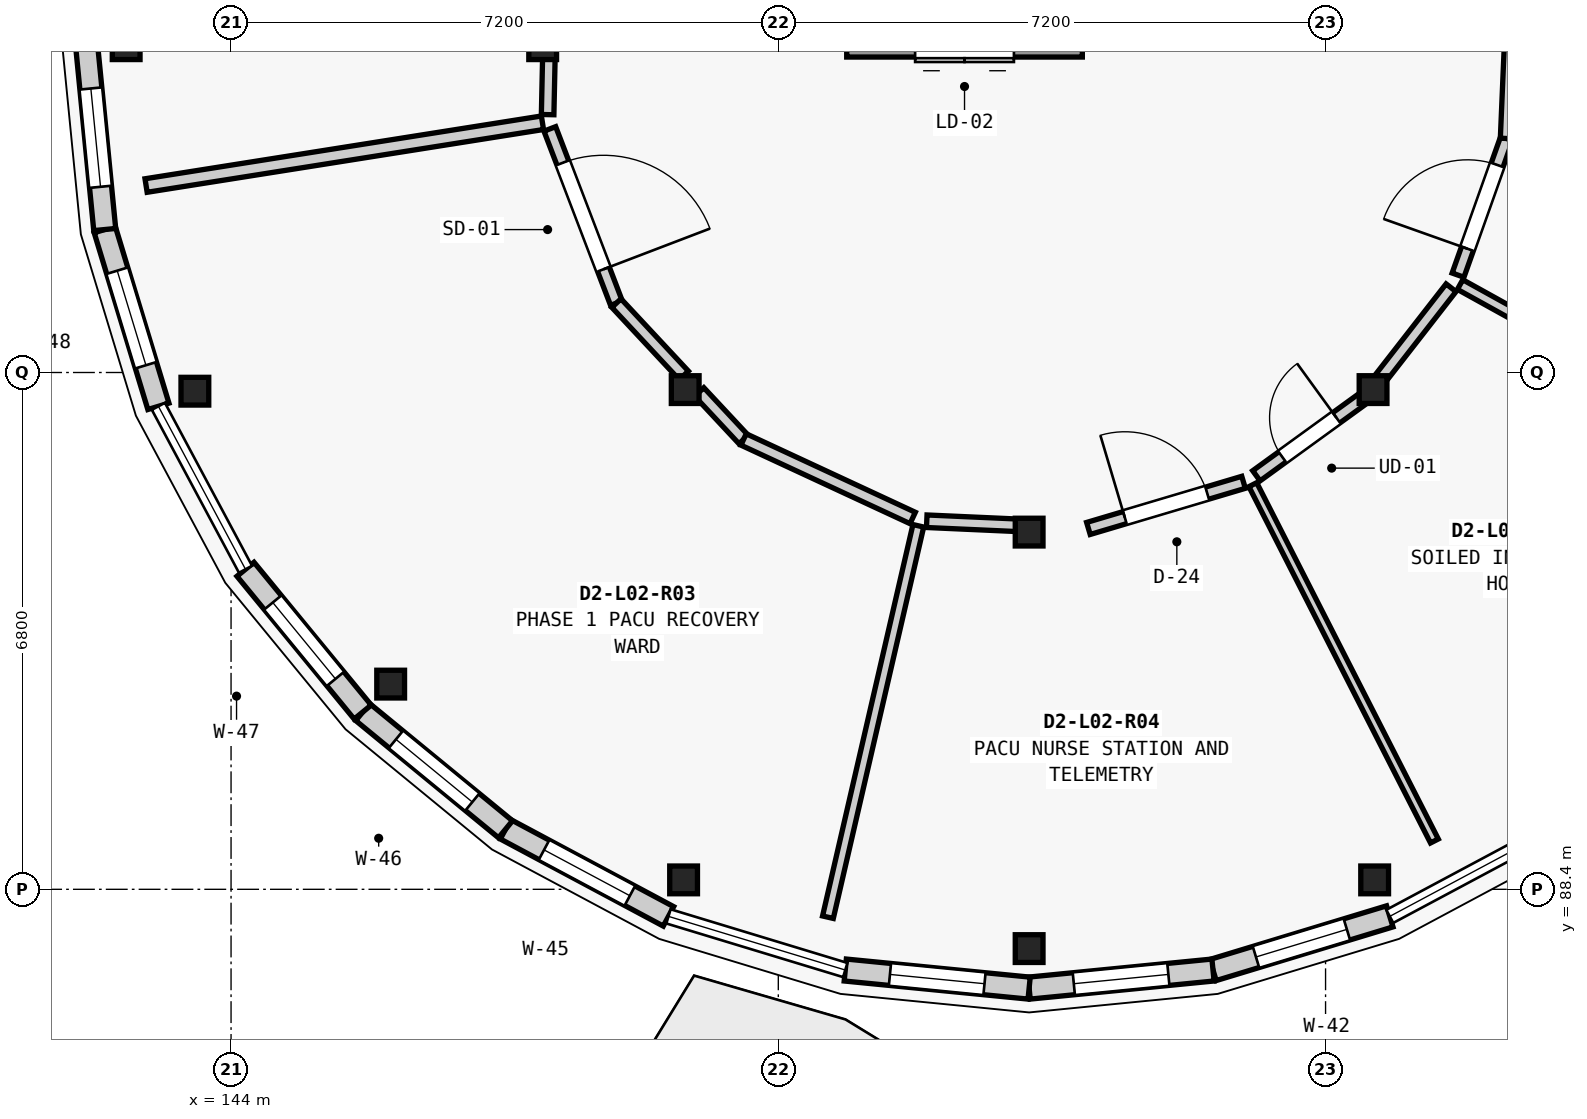
"""IFC4 building model, lengths in metres.
Left out: names, types, materials, properties, quantities, classifications, styles, units other than length and angle.
Written with IfcOpenShell. Run it as: python <this file> out.ifc"""

import sys

from ifc_helpers import new_model, si_unit, direction, frame, frame_2d, origin, origin_2d, place, context, subcontext, project, spatial, rectangle, extrude, element, fill, save


model = new_model("IFC4")
c1 = context("Model", 3, precision=1e-05, world=origin(), true_north=direction((0.0, 1.0)))
c2 = subcontext(c1, "Body", "Model", "MODEL_VIEW")
j1 = project(units=[si_unit("LENGTHUNIT", "METRE"), si_unit("PLANEANGLEUNIT", "RADIAN")], contexts=[c1])
p1 = place(None, origin())
s1 = spatial("IfcSite", under=j1, at=p1, CompositionType="ELEMENT")
p2 = place(p1, origin())
s2 = spatial("IfcBuilding", under=s1, at=p2, CompositionType="ELEMENT")
p3 = place(p2, frame((0.0, 0.0, 8.75)))
s3 = spatial("IfcBuildingStorey", under=s2, at=p3, CompositionType="ELEMENT", Elevation=8.75)
for number, where, z_axis, x_axis in (
    (1, (142.62, 99.5, 0.0), (0.0, 0.0, 1.0), (1.0, 0.0, 0.0)),
    (2, (143.524, 94.954, 0.0), (0.0, 0.0, 1.0), (1.0, 0.0, 0.0)),
    (3, (146.1, 91.1, 0.0), (0.0, 0.0, 1.0), (1.0, 0.0, 0.0)),
    (4, (149.954, 88.524, 0.0), (0.0, 0.0, 1.0), (1.0, 0.0, 0.0)),
    (5, (154.5, 87.62, 0.0), (0.0, 0.0, 1.0), (1.0, 0.0, 0.0)),
    (6, (159.046, 88.524, 0.0), (0.0, 0.0, 1.0), (1.0, 0.0, 0.0)),
    (7, (148.1, 99.5, 0.0), (0.0, 0.0, 1.0), (1.0, 0.0, 0.0)),
    (8, (149.975, 94.975, 0.0), (0.0, 0.0, 1.0), (1.0, 0.0, 0.0)),
    (9, (154.5, 93.1, 0.0), (0.0, 0.0, 1.0), (1.0, 0.0, 0.0)),
    (10, (159.025, 94.975, 0.0), (0.0, 0.0, 1.0), (1.0, 0.0, 0.0)),
):
    element("IfcColumn", number, at=place(p3, frame(where, z_axis=z_axis, x_axis=x_axis)), inside=s3, PredefinedType="COLUMN", context=c2, shape_type="SweptSolid", body=[
        extrude(rectangle(XDim=0.365, YDim=0.365, at=origin_2d()), origin(), (0.0, 0.0, 1.0), 4.2),
    ])
p4 = place(p3, frame((159.245, 88.044, 0.0), z_axis=(0.0, 0.0, 1.0), x_axis=(-0.956892539407, -0.290442193951, 0.0)))
e11 = element("IfcWall", 11, at=p4, inside=s3, PredefinedType="ELEMENTEDWALL", context=c2, shape_type="SweptSolid", body=[
    extrude(rectangle(XDim=2.431, YDim=0.29, at=frame_2d((1.215, 0.0))), origin(), (0.0, 0.0, 1.0), 3.329),
])
p5 = place(p4, frame((0.59, 0.0, 0.85)))
e12 = element("IfcOpeningElement", 12, at=p5, cuts=e11, PredefinedType="OPENING", context=c2, shape_type="SweptSolid", body=[
    extrude(rectangle(XDim=1.25, YDim=1.5, at=frame_2d((0.625, 0.75))), frame((0.0, 0.155, 0.0), z_axis=(0.0, -1.0, 0.0), x_axis=(1.0, 0.0, 0.0)), (0.0, 0.0, 1.0), 0.31),
])
p6 = place(p3, frame((156.919, 87.338, 0.0), z_axis=(0.0, 0.0, 1.0), x_axis=(-0.995202863323, -0.097832820839, 0.0)))
e13 = element("IfcWall", 13, at=p6, inside=s3, PredefinedType="ELEMENTEDWALL", context=c2, shape_type="SweptSolid", body=[
    extrude(rectangle(XDim=2.431, YDim=0.29, at=frame_2d((1.215, 0.0))), origin(), (0.0, 0.0, 1.0), 3.329),
])
p7 = place(p6, frame((0.59, 0.0, 0.85)))
e14 = element("IfcOpeningElement", 14, at=p7, cuts=e13, PredefinedType="OPENING", context=c2, shape_type="SweptSolid", body=[
    extrude(rectangle(XDim=1.25, YDim=1.8, at=frame_2d((0.625, 0.9))), frame((0.0, 0.155, 0.0), z_axis=(0.0, -1.0, 0.0), x_axis=(1.0, 0.0, 0.0)), (0.0, 0.0, 1.0), 0.31),
])
p8 = place(p3, frame((154.5, 87.1, 0.0), z_axis=(0.0, 0.0, 1.0), x_axis=(-0.995202863323, 0.097832820839, 0.0)))
e15 = element("IfcWall", 15, at=p8, inside=s3, PredefinedType="ELEMENTEDWALL", context=c2, shape_type="SweptSolid", body=[
    extrude(rectangle(XDim=2.431, YDim=0.29, at=frame_2d((1.215, 0.0))), origin(), (0.0, 0.0, 1.0), 3.329),
])
p9 = place(p8, frame((0.59, 0.0, 0.85)))
e16 = element("IfcOpeningElement", 16, at=p9, cuts=e15, PredefinedType="OPENING", context=c2, shape_type="SweptSolid", body=[
    extrude(rectangle(XDim=1.25, YDim=2.1, at=frame_2d((0.625, 1.05))), frame((0.0, 0.155, 0.0), z_axis=(0.0, -1.0, 0.0), x_axis=(1.0, 0.0, 0.0)), (0.0, 0.0, 1.0), 0.31),
])
p10 = place(p3, frame((149.755, 88.044, 0.0), z_axis=(0.0, 0.0, 1.0), x_axis=(-0.881902152415, 0.471432490996, 0.0)))
e17 = element("IfcWall", 17, at=p10, inside=s3, PredefinedType="ELEMENTEDWALL", context=c2, shape_type="SweptSolid", body=[
    extrude(rectangle(XDim=2.431, YDim=0.29, at=frame_2d((1.215, 0.0))), origin(), (0.0, 0.0, 1.0), 3.329),
])
p11 = place(p10, frame((0.576, 0.0, 0.85)))
e18 = element("IfcOpeningElement", 18, at=p11, cuts=e17, PredefinedType="OPENING", context=c2, shape_type="SweptSolid", body=[
    extrude(rectangle(XDim=1.28, YDim=1.65, at=frame_2d((0.64, 0.825))), frame((0.0, 0.155, 0.0), z_axis=(0.0, -1.0, 0.0), x_axis=(1.0, 0.0, 0.0)), (0.0, 0.0, 1.0), 0.31),
])
p12 = place(p3, frame((147.611, 89.19, 0.0), z_axis=(0.0, 0.0, 1.0), x_axis=(-0.773048113134, 0.634347392822, 0.0)))
e19 = element("IfcWall", 19, at=p12, inside=s3, PredefinedType="ELEMENTEDWALL", context=c2, shape_type="SweptSolid", body=[
    extrude(rectangle(XDim=2.431, YDim=0.29, at=frame_2d((1.215, 0.0))), origin(), (0.0, 0.0, 1.0), 3.329),
])
p13 = place(p12, frame((0.565, 0.0, 0.85)))
e20 = element("IfcOpeningElement", 20, at=p13, cuts=e19, PredefinedType="OPENING", context=c2, shape_type="SweptSolid", body=[
    extrude(rectangle(XDim=1.3, YDim=1.4, at=frame_2d((0.65, 0.7))), frame((0.0, 0.155, 0.0), z_axis=(0.0, -1.0, 0.0), x_axis=(1.0, 0.0, 0.0)), (0.0, 0.0, 1.0), 0.31),
])
p14 = place(p3, frame((145.732, 90.732, 0.0), z_axis=(0.0, 0.0, 1.0), x_axis=(-0.634347392822, 0.773048113134, 0.0)))
e21 = element("IfcWall", 21, at=p14, inside=s3, PredefinedType="ELEMENTEDWALL", context=c2, shape_type="SweptSolid", body=[
    extrude(rectangle(XDim=2.431, YDim=0.29, at=frame_2d((1.215, 0.0))), origin(), (0.0, 0.0, 1.0), 3.329),
])
p15 = place(p14, frame((0.565, 0.0, 0.85)))
e22 = element("IfcOpeningElement", 22, at=p15, cuts=e21, PredefinedType="OPENING", context=c2, shape_type="SweptSolid", body=[
    extrude(rectangle(XDim=1.3, YDim=1.7, at=frame_2d((0.65, 0.85))), frame((0.0, 0.155, 0.0), z_axis=(0.0, -1.0, 0.0), x_axis=(1.0, 0.0, 0.0)), (0.0, 0.0, 1.0), 0.31),
])
p16 = place(p3, frame((143.044, 94.755, 0.0), z_axis=(0.0, 0.0, 1.0), x_axis=(-0.290442193951, 0.956892539407, 0.0)))
e23 = element("IfcWall", 23, at=p16, inside=s3, PredefinedType="ELEMENTEDWALL", context=c2, shape_type="SweptSolid", body=[
    extrude(rectangle(XDim=2.431, YDim=0.29, at=frame_2d((1.215, 0.0))), origin(), (0.0, 0.0, 1.0), 3.329),
])
p17 = place(p16, frame((0.565, 0.0, 0.85)))
e24 = element("IfcOpeningElement", 24, at=p17, cuts=e23, PredefinedType="OPENING", context=c2, shape_type="SweptSolid", body=[
    extrude(rectangle(XDim=1.3, YDim=2.0, at=frame_2d((0.65, 1.0))), frame((0.0, 0.155, 0.0), z_axis=(0.0, -1.0, 0.0), x_axis=(1.0, 0.0, 0.0)), (0.0, 0.0, 1.0), 0.31),
])
p18 = place(p3, frame((142.338, 97.081, 0.0), z_axis=(0.0, 0.0, 1.0), x_axis=(-0.097832820839, 0.995202863323, 0.0)))
e25 = element("IfcWall", 25, at=p18, inside=s3, PredefinedType="ELEMENTEDWALL", context=c2, shape_type="SweptSolid", body=[
    extrude(rectangle(XDim=2.431, YDim=0.29, at=frame_2d((1.215, 0.0))), origin(), (0.0, 0.0, 1.0), 3.329),
])
p19 = place(p18, frame((0.565, 0.0, 0.7)))
e26 = element("IfcOpeningElement", 26, at=p19, cuts=e25, PredefinedType="OPENING", context=c2, shape_type="SweptSolid", body=[
    extrude(rectangle(XDim=1.3, YDim=2.3, at=frame_2d((0.65, 1.15))), frame((0.0, 0.155, 0.0), z_axis=(0.0, -1.0, 0.0), x_axis=(1.0, 0.0, 0.0)), (0.0, 0.0, 1.0), 0.31),
])
p20 = place(p3, frame((152.1, 99.463, 0.0), z_axis=(0.0, 0.0, 1.0), x_axis=(1.0, 0.0, 0.0)))
e27 = element("IfcWall", 27, at=p20, inside=s3, PredefinedType="SHEAR", context=c2, shape_type="SweptSolid", body=[
    extrude(rectangle(XDim=3.1, YDim=0.225, at=frame_2d((1.55, 0.0))), origin(), (0.0, 0.0, 1.0), 3.975),
])
p21 = place(p20, frame((0.9, 0.0, 0.0)))
e28 = element("IfcOpeningElement", 28, at=p21, cuts=e27, PredefinedType="OPENING", context=c2, shape_type="SweptSolid", body=[
    extrude(rectangle(XDim=1.3, YDim=2.2, at=frame_2d((0.65, 1.1))), frame((0.0, 0.123, 0.0), z_axis=(0.0, -1.0, 0.0), x_axis=(1.0, 0.0, 0.0)), (0.0, 0.0, 1.0), 0.245),
])
p22 = place(p3, frame((148.097, 98.486, 0.0), z_axis=(0.0, 0.0, 1.0), x_axis=(-0.98768185006, -0.156475439167, 0.0)))
e29 = element("IfcWall", 29, at=p22, inside=s3, PredefinedType="PARTITIONING", context=c2, shape_type="SweptSolid", body=[
    extrude(rectangle(XDim=5.28, YDim=0.18, at=frame_2d((2.64, 0.0))), origin(), (0.0, 0.0, 1.0), 3.304),
])
p23 = place(p3, frame((153.042, 93.183, 0.0), z_axis=(0.0, 0.0, 1.0), x_axis=(-0.224943840984, -0.974371730093, 0.0)))
e30 = element("IfcWall", 30, at=p23, inside=s3, PredefinedType="PARTITIONING", context=c2, shape_type="SweptSolid", body=[
    extrude(rectangle(XDim=5.286, YDim=0.145, at=frame_2d((2.643, 0.0))), origin(), (0.0, 0.0, 1.0), 3.304),
])
p24 = place(p3, frame((157.443, 93.724, 0.0), z_axis=(0.0, 0.0, 1.0), x_axis=(0.454011967175, -0.890995585658, 0.0)))
e31 = element("IfcWall", 31, at=p24, inside=s3, PredefinedType="PARTITIONING", context=c2, shape_type="SweptSolid", body=[
    extrude(rectangle(XDim=5.262, YDim=0.115, at=frame_2d((2.631, 0.0))), origin(), (0.0, 0.0, 1.0), 3.304),
])
p25 = place(p3, frame((160.17, 96.357, 0.0), z_axis=(0.0, 0.0, 1.0), x_axis=(0.874649389138, -0.484756068638, 0.0)))
e32 = element("IfcWall", 32, at=p25, inside=s3, PredefinedType="PARTITIONING", context=c2, shape_type="SweptSolid", body=[
    extrude(rectangle(XDim=5.26, YDim=0.145, at=frame_2d((2.63, 0.0))), origin(), (0.0, 0.0, 1.0), 3.304),
])
p26 = place(p3, frame((148.181, 99.331, 0.0), z_axis=(0.0, 0.0, 1.0), x_axis=(-0.021496850658, -0.999768916006, 0.0)))
e33 = element("IfcWall", 33, at=p26, inside=s3, PredefinedType="PARTITIONING", context=c2, shape_type="SweptSolid", body=[
    extrude(rectangle(XDim=0.738, YDim=0.165, at=frame_2d((0.369, 0.0))), origin(), (0.0, 0.0, 1.0), 3.304),
])
p27 = place(p3, frame((148.194, 98.405, 0.0), z_axis=(0.0, 0.0, 1.0), x_axis=(0.357004696351, -0.934102589004, 0.0)))
e34 = element("IfcWall", 34, at=p27, inside=s3, PredefinedType="PARTITIONING", context=c2, shape_type="SweptSolid", body=[
    extrude(rectangle(XDim=2.454, YDim=0.165, at=frame_2d((1.227, 0.0))), origin(), (0.0, 0.0, 1.0), 3.304),
])
p28 = place(p27, frame((0.477, 0.0, 0.0)))
e35 = element("IfcOpeningElement", 35, at=p28, cuts=e34, PredefinedType="OPENING", context=c2, shape_type="SweptSolid", body=[
    extrude(rectangle(XDim=1.5, YDim=2.3, at=frame_2d((0.75, 1.15))), frame((0.0, 0.093, 0.0), z_axis=(0.0, -1.0, 0.0), x_axis=(1.0, 0.0, 0.0)), (0.0, 0.0, 1.0), 0.185),
])
p29 = place(p3, frame((149.07, 96.113, 0.0), z_axis=(0.0, 0.0, 1.0), x_axis=(0.682084089324, -0.731273748395, 0.0)))
e36 = element("IfcWall", 36, at=p29, inside=s3, PredefinedType="PARTITIONING", context=c2, shape_type="SweptSolid", body=[
    extrude(rectangle(XDim=1.3, YDim=0.165, at=frame_2d((0.65, 0.0))), origin(), (0.0, 0.0, 1.0), 3.304),
])
p30 = place(p3, frame((150.16, 94.944, 0.0), z_axis=(0.0, 0.0, 1.0), x_axis=(0.682114678072, -0.731245216024, 0.0)))
e37 = element("IfcWall", 37, at=p30, inside=s3, PredefinedType="PARTITIONING", context=c2, shape_type="SweptSolid", body=[
    extrude(rectangle(XDim=0.855, YDim=0.165, at=frame_2d((0.427, 0.0))), origin(), (0.0, 0.0, 1.0), 3.304),
])
p31 = place(p3, frame((150.743, 94.319, 0.0), z_axis=(0.0, 0.0, 1.0), x_axis=(0.906989961647, -0.421152240255, 0.0)))
e38 = element("IfcWall", 38, at=p31, inside=s3, PredefinedType="PARTITIONING", context=c2, shape_type="SweptSolid", body=[
    extrude(rectangle(XDim=2.453, YDim=0.165, at=frame_2d((1.227, 0.0))), origin(), (0.0, 0.0, 1.0), 3.304),
])
p32 = place(p3, frame((153.153, 93.243, 0.0), z_axis=(0.0, 0.0, 1.0), x_axis=(0.998998504247, -0.044743586258, 0.0)))
e39 = element("IfcWall", 39, at=p32, inside=s3, PredefinedType="PARTITIONING", context=c2, shape_type="SweptSolid", body=[
    extrude(rectangle(XDim=1.184, YDim=0.165, at=frame_2d((0.592, 0.0))), origin(), (0.0, 0.0, 1.0), 3.304),
])
p33 = place(p3, frame((155.28, 93.148, 0.0), z_axis=(0.0, 0.0, 1.0), x_axis=(0.958517732376, 0.285032904628, 0.0)))
e40 = element("IfcWall", 40, at=p33, inside=s3, PredefinedType="PARTITIONING", context=c2, shape_type="SweptSolid", body=[
    extrude(rectangle(XDim=2.129, YDim=0.165, at=frame_2d((1.065, 0.0))), origin(), (0.0, 0.0, 1.0), 3.304),
])
p34 = place(p33, frame((0.5, 0.0, 0.0)))
e41 = element("IfcOpeningElement", 41, at=p34, cuts=e40, PredefinedType="OPENING", context=c2, shape_type="SweptSolid", body=[
    extrude(rectangle(XDim=1.13, YDim=2.14, at=frame_2d((0.565, 1.07))), frame((0.0, 0.093, 0.0), z_axis=(0.0, -1.0, 0.0), x_axis=(1.0, 0.0, 0.0)), (0.0, 0.0, 1.0), 0.185),
])
p35 = place(p3, frame((157.49, 93.841, 0.0), z_axis=(0.0, 0.0, 1.0), x_axis=(0.809526218979, 0.587083725533, 0.0)))
e42 = element("IfcWall", 42, at=p35, inside=s3, PredefinedType="PARTITIONING", context=c2, shape_type="SweptSolid", body=[
    extrude(rectangle(XDim=1.722, YDim=0.165, at=frame_2d((0.861, 0.0))), origin(), (0.0, 0.0, 1.0), 3.304),
])
p36 = place(p35, frame((0.421, 0.0, 0.0)))
e43 = element("IfcOpeningElement", 43, at=p36, cuts=e42, PredefinedType="OPENING", context=c2, shape_type="SweptSolid", body=[
    extrude(rectangle(XDim=0.88, YDim=2.1, at=frame_2d((0.44, 1.05))), frame((0.0, 0.093, 0.0), z_axis=(0.0, -1.0, 0.0), x_axis=(1.0, 0.0, 0.0)), (0.0, 0.0, 1.0), 0.185),
])
p37 = place(p3, frame((159.129, 95.131, 0.0), z_axis=(0.0, 0.0, 1.0), x_axis=(0.61450363649, 0.788913988176, 0.0)))
e44 = element("IfcWall", 44, at=p37, inside=s3, PredefinedType="PARTITIONING", context=c2, shape_type="SweptSolid", body=[
    extrude(rectangle(XDim=1.5, YDim=0.165, at=frame_2d((0.75, 0.0))), origin(), (0.0, 0.0, 1.0), 3.304),
])
p38 = place(p3, frame((160.143, 96.481, 0.0), z_axis=(0.0, 0.0, 1.0), x_axis=(0.334820358273, 0.942281978861, 0.0)))
e45 = element("IfcWall", 45, at=p38, inside=s3, PredefinedType="PARTITIONING", context=c2, shape_type="SweptSolid", body=[
    extrude(rectangle(XDim=1.908, YDim=0.165, at=frame_2d((0.954, 0.0))), origin(), (0.0, 0.0, 1.0), 3.304),
])
p39 = place(p38, frame((0.369, 0.0, 0.0)))
e46 = element("IfcOpeningElement", 46, at=p39, cuts=e45, PredefinedType="OPENING", context=c2, shape_type="SweptSolid", body=[
    extrude(rectangle(XDim=1.17, YDim=2.24, at=frame_2d((0.585, 1.12))), frame((0.0, 0.093, 0.0), z_axis=(0.0, -1.0, 0.0), x_axis=(1.0, 0.0, 0.0)), (0.0, 0.0, 1.0), 0.185),
])
p40 = place(p3, frame((160.782, 98.279, 0.0), z_axis=(0.0, 0.0, 1.0), x_axis=(0.042465818656, 0.999097920249, 0.0)))
e47 = element("IfcWall", 47, at=p40, inside=s3, PredefinedType="PARTITIONING", context=c2, shape_type="SweptSolid", body=[
    extrude(rectangle(XDim=1.909, YDim=0.165, at=frame_2d((0.954, 0.0))), origin(), (0.0, 0.0, 1.0), 3.304),
])
p41 = place(p5, origin())
e48 = element("IfcWindow", 48, at=p41, inside=s3, PartitioningType="SINGLE_PANEL", PredefinedType="WINDOW", context=c2, shape_type="SweptSolid", body=[
    extrude(rectangle(XDim=1.25, YDim=1.5, at=frame_2d((0.625, 0.75))), frame((0.0, 0.03, 0.0), z_axis=(0.0, -1.0, 0.0), x_axis=(1.0, 0.0, 0.0)), (0.0, 0.0, 1.0), 0.06),
])
fill(e12, e48)
p42 = place(p7, origin())
e49 = element("IfcWindow", 49, at=p42, inside=s3, PartitioningType="SINGLE_PANEL", PredefinedType="WINDOW", context=c2, shape_type="SweptSolid", body=[
    extrude(rectangle(XDim=1.25, YDim=1.8, at=frame_2d((0.625, 0.9))), frame((0.0, 0.03, 0.0), z_axis=(0.0, -1.0, 0.0), x_axis=(1.0, 0.0, 0.0)), (0.0, 0.0, 1.0), 0.06),
])
fill(e14, e49)
p43 = place(p9, origin())
e50 = element("IfcWindow", 50, at=p43, inside=s3, PartitioningType="SINGLE_PANEL", PredefinedType="WINDOW", context=c2, shape_type="SweptSolid", body=[
    extrude(rectangle(XDim=1.25, YDim=2.1, at=frame_2d((0.625, 1.05))), frame((0.0, 0.03, 0.0), z_axis=(0.0, -1.0, 0.0), x_axis=(1.0, 0.0, 0.0)), (0.0, 0.0, 1.0), 0.06),
])
fill(e16, e50)
p44 = place(p11, origin())
e51 = element("IfcWindow", 51, at=p44, inside=s3, PartitioningType="SINGLE_PANEL", PredefinedType="WINDOW", context=c2, shape_type="SweptSolid", body=[
    extrude(rectangle(XDim=1.28, YDim=1.65, at=frame_2d((0.64, 0.825))), frame((0.0, 0.03, 0.0), z_axis=(0.0, -1.0, 0.0), x_axis=(1.0, 0.0, 0.0)), (0.0, 0.0, 1.0), 0.06),
])
fill(e18, e51)
p45 = place(p13, origin())
e52 = element("IfcWindow", 52, at=p45, inside=s3, PartitioningType="SINGLE_PANEL", PredefinedType="WINDOW", context=c2, shape_type="SweptSolid", body=[
    extrude(rectangle(XDim=1.3, YDim=1.4, at=frame_2d((0.65, 0.7))), frame((0.0, 0.03, 0.0), z_axis=(0.0, -1.0, 0.0), x_axis=(1.0, 0.0, 0.0)), (0.0, 0.0, 1.0), 0.06),
])
fill(e20, e52)
p46 = place(p15, origin())
e53 = element("IfcWindow", 53, at=p46, inside=s3, PartitioningType="SINGLE_PANEL", PredefinedType="WINDOW", context=c2, shape_type="SweptSolid", body=[
    extrude(rectangle(XDim=1.3, YDim=1.7, at=frame_2d((0.65, 0.85))), frame((0.0, 0.03, 0.0), z_axis=(0.0, -1.0, 0.0), x_axis=(1.0, 0.0, 0.0)), (0.0, 0.0, 1.0), 0.06),
])
fill(e22, e53)
p47 = place(p17, origin())
e54 = element("IfcWindow", 54, at=p47, inside=s3, PartitioningType="SINGLE_PANEL", PredefinedType="WINDOW", context=c2, shape_type="SweptSolid", body=[
    extrude(rectangle(XDim=1.3, YDim=2.0, at=frame_2d((0.65, 1.0))), frame((0.0, 0.03, 0.0), z_axis=(0.0, -1.0, 0.0), x_axis=(1.0, 0.0, 0.0)), (0.0, 0.0, 1.0), 0.06),
])
fill(e24, e54)
p48 = place(p19, origin())
e55 = element("IfcWindow", 55, at=p48, inside=s3, PartitioningType="SINGLE_PANEL", PredefinedType="WINDOW", context=c2, shape_type="SweptSolid", body=[
    extrude(rectangle(XDim=1.3, YDim=2.3, at=frame_2d((0.65, 1.15))), frame((0.0, 0.03, 0.0), z_axis=(0.0, -1.0, 0.0), x_axis=(1.0, 0.0, 0.0)), (0.0, 0.0, 1.0), 0.06),
])
fill(e26, e55)
p49 = place(p28, origin())
e56 = element("IfcDoor", 56, at=p49, inside=s3, OperationType="SINGLE_SWING_RIGHT", PredefinedType="DOOR", context=c2, shape_type="SweptSolid", body=[
    extrude(rectangle(XDim=1.5, YDim=2.3, at=frame_2d((0.75, 1.15))), frame((0.0, 0.025, 0.0), z_axis=(0.0, -1.0, 0.0), x_axis=(1.0, 0.0, 0.0)), (0.0, 0.0, 1.0), 0.05),
])
fill(e35, e56)
p50 = place(p34, origin())
e57 = element("IfcDoor", 57, at=p50, inside=s3, OperationType="SINGLE_SWING_LEFT", PredefinedType="DOOR", context=c2, shape_type="SweptSolid", body=[
    extrude(rectangle(XDim=1.13, YDim=2.14, at=frame_2d((0.565, 1.07))), frame((0.0, 0.025, 0.0), z_axis=(0.0, -1.0, 0.0), x_axis=(1.0, 0.0, 0.0)), (0.0, 0.0, 1.0), 0.05),
])
fill(e41, e57)
p51 = place(p36, origin())
e58 = element("IfcDoor", 58, at=p51, inside=s3, OperationType="SINGLE_SWING_RIGHT", PredefinedType="DOOR", context=c2, shape_type="SweptSolid", body=[
    extrude(rectangle(XDim=0.88, YDim=2.1, at=frame_2d((0.44, 1.05))), frame((0.0, 0.025, 0.0), z_axis=(0.0, -1.0, 0.0), x_axis=(1.0, 0.0, 0.0)), (0.0, 0.0, 1.0), 0.05),
])
fill(e43, e58)
p52 = place(p39, origin())
e59 = element("IfcDoor", 59, at=p52, inside=s3, OperationType="SINGLE_SWING_LEFT", PredefinedType="DOOR", context=c2, shape_type="SweptSolid", body=[
    extrude(rectangle(XDim=1.17, YDim=2.24, at=frame_2d((0.585, 1.12))), frame((0.0, 0.025, 0.0), z_axis=(0.0, -1.0, 0.0), x_axis=(1.0, 0.0, 0.0)), (0.0, 0.0, 1.0), 0.05),
])
fill(e46, e59)
save(model, sys.argv[1])
